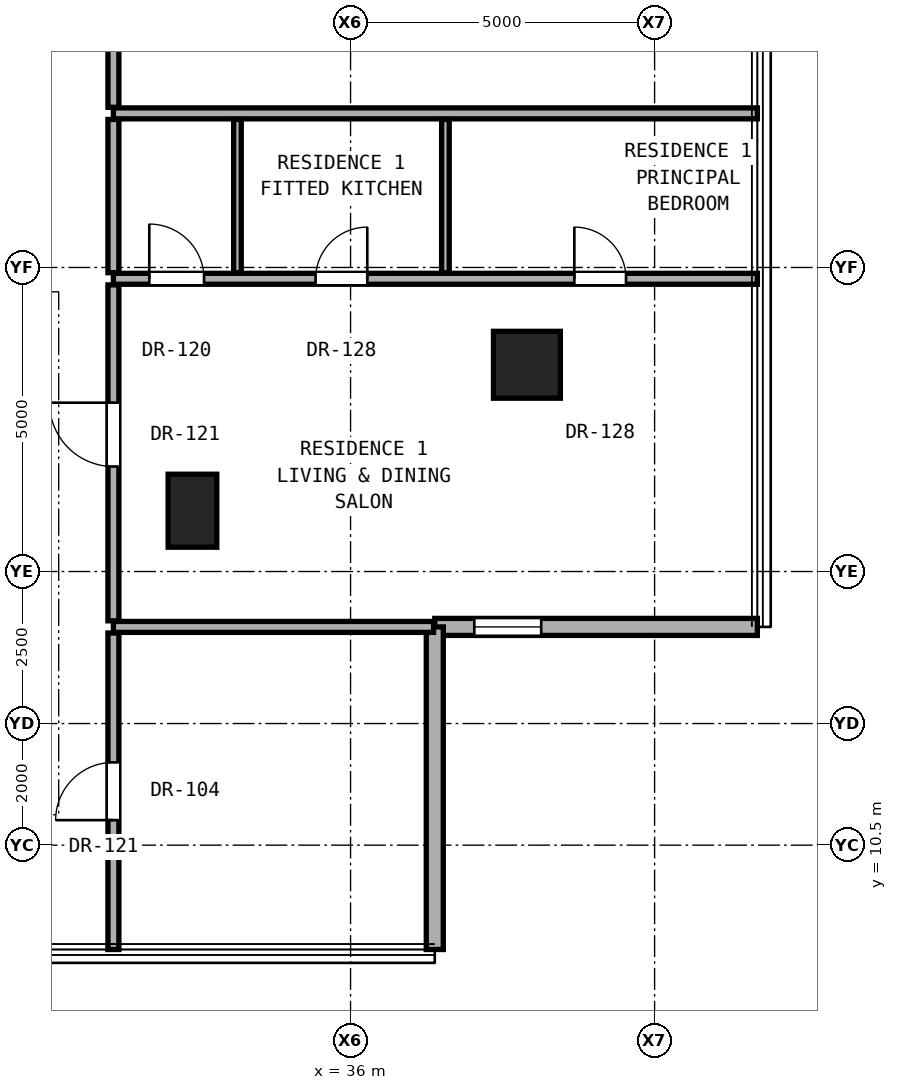
"""IFC4 building model, lengths in metres.
Left out: names, types, materials, properties, quantities, classifications, styles, units other than length and angle.
Written with IfcOpenShell. Run it as: python <this file> out.ifc"""

import sys

from ifc_helpers import new_model, si_unit, direction, frame, frame_2d, origin, origin_2d, place, context, subcontext, project, spatial, rectangle, hollow_rectangle, extrude, element, fill, save


model = new_model("IFC4")
c1 = context("Model", 3, precision=1e-05, world=origin(), true_north=direction((0.0, 1.0)))
c2 = subcontext(c1, "Body", "Model", "MODEL_VIEW")
j1 = project(units=[si_unit("LENGTHUNIT", "METRE"), si_unit("PLANEANGLEUNIT", "RADIAN")], contexts=[c1])
p1 = place(None, origin())
s1 = spatial("IfcSite", under=j1, at=p1, CompositionType="ELEMENT")
p2 = place(p1, origin())
s2 = spatial("IfcBuilding", under=s1, at=p2, CompositionType="ELEMENT")
p3 = place(p2, frame((0.0, 0.0, 111.5)))
s3 = spatial("IfcBuildingStorey", under=s2, at=p3, CompositionType="ELEMENT", Elevation=111.5)
p4 = place(p3, frame((38.9, 18.4, 0.0), z_axis=(0.0, 0.0, 1.0), x_axis=(1.0, 0.0, 0.0)))
e1 = element("IfcColumn", 1, at=p4, inside=s3, PredefinedType="COLUMN", context=c2, shape_type="SweptSolid", body=[
    extrude(hollow_rectangle(XDim=1.1, YDim=1.1, WallThickness=0.06, at=origin_2d()), origin(), (0.0, 0.0, 1.0), 3.3),
])
p5 = place(p3, frame((33.4, 16.0, 0.0), z_axis=(0.0, 0.0, 1.0), x_axis=(1.0, 0.0, 0.0)))
e2 = element("IfcColumn", 2, at=p5, inside=s3, PredefinedType="PILASTER", context=c2, shape_type="SweptSolid", body=[
    extrude(rectangle(XDim=0.8, YDim=1.2, at=origin_2d()), origin(), (0.0, 0.0, 1.0), 3.3),
])
p6 = place(p3, frame((37.385, 14.089, 0.0), z_axis=(0.0, 0.0, 1.0), x_axis=(1.0, 0.0, 0.0)))
e3 = element("IfcWall", 3, at=p6, inside=s3, PredefinedType="SOLIDWALL", context=c2, shape_type="SweptSolid", body=[
    extrude(rectangle(XDim=5.305, YDim=0.28, at=frame_2d((2.652, 0.0))), origin(), (0.0, 0.0, 1.0), 3.06),
])
p7 = place(p6, frame((0.65, 0.0, 0.85)))
e4 = element("IfcOpeningElement", 4, at=p7, cuts=e3, PredefinedType="OPENING", context=c2, shape_type="SweptSolid", body=[
    extrude(rectangle(XDim=1.1, YDim=2.0, at=frame_2d((0.55, 1.0))), frame((0.0, 0.15, 0.0), z_axis=(0.0, -1.0, 0.0), x_axis=(1.0, 0.0, 0.0)), (0.0, 0.0, 1.0), 0.3),
])
p8 = place(p3, frame((37.385, 8.784, 0.0), z_axis=(0.0, 0.0, 1.0), x_axis=(0.0, 1.0, 0.0)))
e5 = element("IfcWall", 5, at=p8, inside=s3, PredefinedType="SOLIDWALL", context=c2, shape_type="SweptSolid", body=[
    extrude(rectangle(XDim=5.305, YDim=0.28, at=frame_2d((2.653, 0.0))), origin(), (0.0, 0.0, 1.0), 3.06),
])
p9 = place(p3, frame((32.1, 14.089, 0.0), z_axis=(0.0, 0.0, 1.0), x_axis=(1.0, 0.0, 0.0)))
e6 = element("IfcWall", 6, at=p9, inside=s3, PredefinedType="PARTITIONING", context=c2, shape_type="SweptSolid", body=[
    extrude(rectangle(XDim=5.265, YDim=0.18, at=frame_2d((2.632, 0.0))), origin(), (0.0, 0.0, 1.0), 3.08),
])
p10 = place(p3, frame((32.1, 19.814, 0.0), z_axis=(0.0, 0.0, 1.0), x_axis=(1.0, 0.0, 0.0)))
e7 = element("IfcWall", 7, at=p10, inside=s3, PredefinedType="PARTITIONING", context=c2, shape_type="SweptSolid", body=[
    extrude(rectangle(XDim=10.59, YDim=0.18, at=frame_2d((5.295, 0.0))), origin(), (0.0, 0.0, 1.0), 2.145),
])
p11 = place(p10, frame((7.58, 0.0, 0.0)))
e8 = element("IfcOpeningElement", 8, at=p11, cuts=e7, PredefinedType="OPENING", context=c2, shape_type="SweptSolid", body=[
    extrude(rectangle(XDim=0.85, YDim=2.01, at=frame_2d((0.425, 1.005))), frame((0.0, 0.1, 0.0), z_axis=(0.0, -1.0, 0.0), x_axis=(1.0, 0.0, 0.0)), (0.0, 0.0, 1.0), 0.2),
])
p12 = place(p10, frame((3.325, 0.0, 0.0)))
e9 = element("IfcOpeningElement", 9, at=p12, cuts=e7, PredefinedType="OPENING", context=c2, shape_type="SweptSolid", body=[
    extrude(rectangle(XDim=0.85, YDim=2.01, at=frame_2d((0.425, 1.005))), frame((0.0, 0.1, 0.0), z_axis=(0.0, -1.0, 0.0), x_axis=(1.0, 0.0, 0.0)), (0.0, 0.0, 1.0), 0.2),
])
p13 = place(p10, frame((0.59, 0.0, 0.0)))
e10 = element("IfcOpeningElement", 10, at=p13, cuts=e7, PredefinedType="OPENING", context=c2, shape_type="SweptSolid", body=[
    extrude(rectangle(XDim=0.9, YDim=2.1, at=frame_2d((0.45, 1.05))), frame((0.0, 0.1, 0.0), z_axis=(0.0, -1.0, 0.0), x_axis=(1.0, 0.0, 0.0)), (0.0, 0.0, 1.0), 0.2),
])
p14 = place(p3, frame((32.1, 22.534, 0.0), z_axis=(0.0, 0.0, 1.0), x_axis=(1.0, 0.0, 0.0)))
e11 = element("IfcWall", 11, at=p14, inside=s3, PredefinedType="PARTITIONING", context=c2, shape_type="SweptSolid", body=[
    extrude(rectangle(XDim=10.59, YDim=0.18, at=frame_2d((5.295, 0.0))), origin(), (0.0, 0.0, 1.0), 2.145),
])
p15 = place(p3, frame((32.1, 8.784, 0.0), z_axis=(0.0, 0.0, 1.0), x_axis=(0.0, 1.0, 0.0)))
e12 = element("IfcWall", 12, at=p15, inside=s3, PredefinedType="PARTITIONING", context=c2, shape_type="SweptSolid", body=[
    extrude(rectangle(XDim=5.205, YDim=0.18, at=frame_2d((2.603, 0.0))), origin(), (0.0, 0.0, 1.0), 3.08),
])
p16 = place(p15, frame((2.127, 0.0, 0.0)))
e13 = element("IfcOpeningElement", 13, at=p16, cuts=e12, PredefinedType="OPENING", context=c2, shape_type="SweptSolid", body=[
    extrude(rectangle(XDim=0.95, YDim=2.15, at=frame_2d((0.475, 1.075))), frame((0.0, 0.1, 0.0), z_axis=(0.0, -1.0, 0.0), x_axis=(1.0, 0.0, 0.0)), (0.0, 0.0, 1.0), 0.2),
])
p17 = place(p3, frame((32.1, 14.189, 0.0), z_axis=(0.0, 0.0, 1.0), x_axis=(0.0, 1.0, 0.0)))
e14 = element("IfcWall", 14, at=p17, inside=s3, PredefinedType="PARTITIONING", context=c2, shape_type="SweptSolid", body=[
    extrude(rectangle(XDim=5.525, YDim=0.18, at=frame_2d((2.763, 0.0))), origin(), (0.0, 0.0, 1.0), 2.456),
])
p18 = place(p17, frame((2.538, 0.0, 0.0)))
e15 = element("IfcOpeningElement", 15, at=p18, cuts=e14, PredefinedType="OPENING", context=c2, shape_type="SweptSolid", body=[
    extrude(rectangle(XDim=1.05, YDim=2.2, at=frame_2d((0.525, 1.1))), frame((0.0, 0.1, 0.0), z_axis=(0.0, -1.0, 0.0), x_axis=(1.0, 0.0, 0.0)), (0.0, 0.0, 1.0), 0.2),
])
p19 = place(p3, frame((32.1, 19.914, 0.0), z_axis=(0.0, 0.0, 1.0), x_axis=(0.0, 1.0, 0.0)))
e16 = element("IfcWall", 16, at=p19, inside=s3, PredefinedType="PARTITIONING", context=c2, shape_type="SweptSolid", body=[
    extrude(rectangle(XDim=2.52, YDim=0.18, at=frame_2d((1.26, 0.0))), origin(), (0.0, 0.0, 1.0), 3.08),
])
p20 = place(p3, frame((32.1, 22.634, 0.0), z_axis=(0.0, 0.0, 1.0), x_axis=(0.0, 1.0, 0.0)))
e17 = element("IfcWall", 17, at=p20, inside=s3, PredefinedType="PARTITIONING", context=c2, shape_type="SweptSolid", body=[
    extrude(rectangle(XDim=4.918, YDim=0.18, at=frame_2d((2.459, 0.0))), origin(), (0.0, 0.0, 1.0), 2.299),
])
p21 = place(p20, frame((1.934, 0.0, 0.0)))
e18 = element("IfcOpeningElement", 18, at=p21, cuts=e17, PredefinedType="OPENING", context=c2, shape_type="SweptSolid", body=[
    extrude(rectangle(XDim=1.05, YDim=2.2, at=frame_2d((0.525, 1.1))), frame((0.0, 0.1, 0.0), z_axis=(0.0, -1.0, 0.0), x_axis=(1.0, 0.0, 0.0)), (0.0, 0.0, 1.0), 0.2),
])
for number, where, z_axis, x_axis in (
    (19, (34.14, 19.914, 0.0), (0.0, 0.0, 1.0), (0.0, 1.0, 0.0)),
    (20, (37.56, 19.914, 0.0), (0.0, 0.0, 1.0), (0.0, 1.0, 0.0)),
):
    element("IfcWall", number, at=place(p3, frame(where, z_axis=z_axis, x_axis=x_axis)), inside=s3, PredefinedType="PARTITIONING", context=c2, shape_type="SweptSolid", body=[
        extrude(rectangle(XDim=2.52, YDim=0.125, at=frame_2d((1.26, 0.0))), origin(), (0.0, 0.0, 1.0), 3.08),
    ])
p22 = place(p7, origin())
e21 = element("IfcWindow", 21, at=p22, inside=s3, PartitioningType="SINGLE_PANEL", PredefinedType="WINDOW", context=c2, shape_type="SweptSolid", body=[
    extrude(rectangle(XDim=1.1, YDim=2.0, at=frame_2d((0.55, 1.0))), frame((0.0, 0.03, 0.0), z_axis=(0.0, -1.0, 0.0), x_axis=(1.0, 0.0, 0.0)), (0.0, 0.0, 1.0), 0.06),
])
fill(e4, e21)
p23 = place(p18, origin())
e22 = element("IfcDoor", 22, at=p23, inside=s3, OperationType="SINGLE_SWING_RIGHT", PredefinedType="DOOR", context=c2, shape_type="SweptSolid", body=[
    extrude(rectangle(XDim=1.05, YDim=2.2, at=frame_2d((0.525, 1.1))), frame((0.0, 0.025, 0.0), z_axis=(0.0, -1.0, 0.0), x_axis=(1.0, 0.0, 0.0)), (0.0, 0.0, 1.0), 0.05),
])
fill(e15, e22)
p24 = place(p11, origin())
e23 = element("IfcDoor", 23, at=p24, inside=s3, OperationType="SINGLE_SWING_LEFT", PredefinedType="DOOR", context=c2, shape_type="SweptSolid", body=[
    extrude(rectangle(XDim=0.85, YDim=2.01, at=frame_2d((0.425, 1.005))), frame((0.0, 0.025, 0.0), z_axis=(0.0, -1.0, 0.0), x_axis=(1.0, 0.0, 0.0)), (0.0, 0.0, 1.0), 0.05),
])
fill(e8, e23)
p25 = place(p12, origin())
e24 = element("IfcDoor", 24, at=p25, inside=s3, OperationType="SINGLE_SWING_RIGHT", PredefinedType="DOOR", context=c2, shape_type="SweptSolid", body=[
    extrude(rectangle(XDim=0.85, YDim=2.01, at=frame_2d((0.425, 1.005))), frame((0.0, 0.025, 0.0), z_axis=(0.0, -1.0, 0.0), x_axis=(1.0, 0.0, 0.0)), (0.0, 0.0, 1.0), 0.05),
])
fill(e9, e24)
p26 = place(p13, origin())
e25 = element("IfcDoor", 25, at=p26, inside=s3, OperationType="SINGLE_SWING_LEFT", PredefinedType="DOOR", context=c2, shape_type="SweptSolid", body=[
    extrude(rectangle(XDim=0.9, YDim=2.1, at=frame_2d((0.45, 1.05))), frame((0.0, 0.025, 0.0), z_axis=(0.0, -1.0, 0.0), x_axis=(1.0, 0.0, 0.0)), (0.0, 0.0, 1.0), 0.05),
])
fill(e10, e25)
p27 = place(p16, origin())
e26 = element("IfcDoor", 26, at=p27, inside=s3, OperationType="SINGLE_SWING_LEFT", PredefinedType="DOOR", context=c2, shape_type="SweptSolid", body=[
    extrude(rectangle(XDim=0.95, YDim=2.15, at=frame_2d((0.475, 1.075))), frame((0.0, 0.025, 0.0), z_axis=(0.0, -1.0, 0.0), x_axis=(1.0, 0.0, 0.0)), (0.0, 0.0, 1.0), 0.05),
])
fill(e13, e26)
save(model, sys.argv[1])
